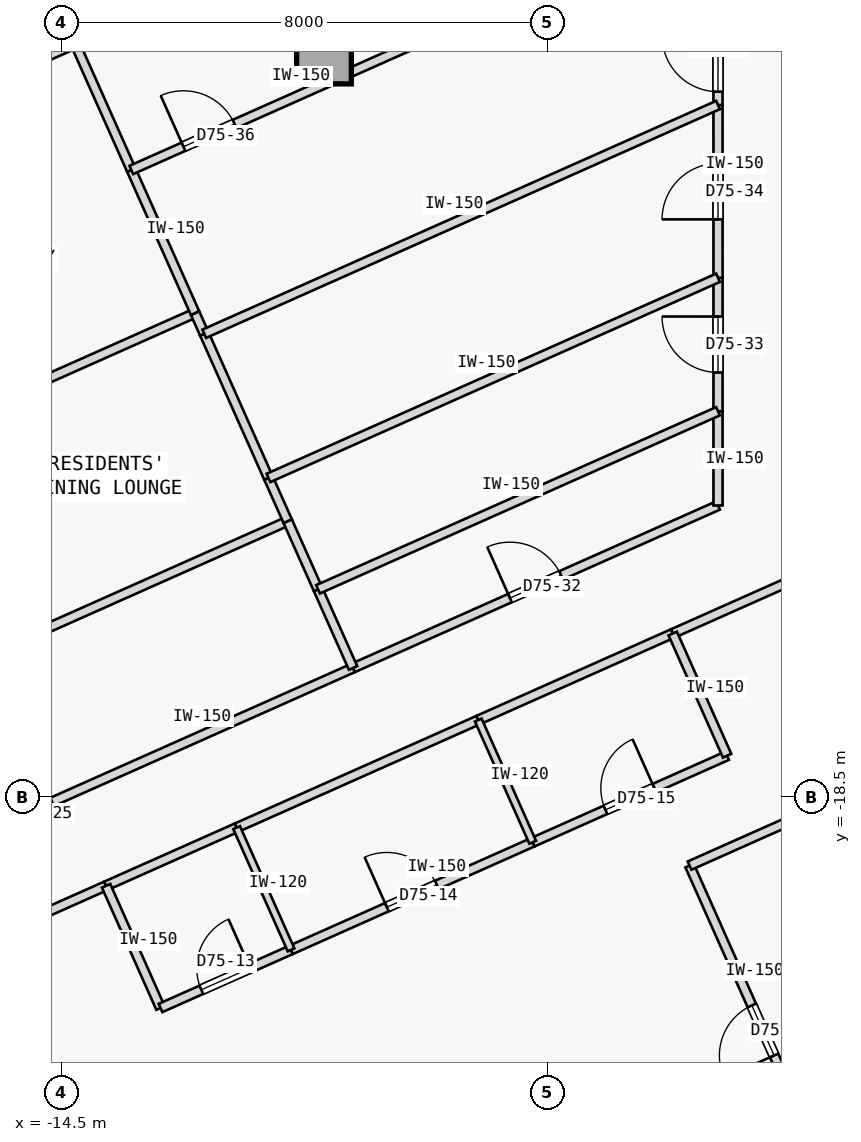
"""IFC4 building model, lengths in metres.
Left out: names, types, materials, properties, quantities, classifications, styles, units other than length and angle.
Written with IfcOpenShell. Run it as: python <this file> out.ifc"""

import sys

from ifc_helpers import new_model, si_unit, direction, frame, frame_2d, origin, origin_2d, place, context, subcontext, project, spatial, rectangle, extrude, element, fill, save


model = new_model("IFC4")
c1 = context("Model", 3, precision=1e-05, world=origin(), true_north=direction((0.0, 1.0)))
c2 = subcontext(c1, "Body", "Model", "MODEL_VIEW")
j1 = project(units=[si_unit("LENGTHUNIT", "METRE"), si_unit("PLANEANGLEUNIT", "RADIAN")], contexts=[c1])
p1 = place(None, origin())
s1 = spatial("IfcSite", under=j1, at=p1, CompositionType="ELEMENT")
p2 = place(p1, origin())
s2 = spatial("IfcBuilding", under=s1, at=p2, CompositionType="ELEMENT")
p3 = place(p2, frame((0.0, 0.0, 281.9)))
s3 = spatial("IfcBuildingStorey", under=s2, at=p3, CompositionType="ELEMENT", Elevation=281.9)
p4 = place(p3, frame((-10.18, -6.32, 0.0), z_axis=(0.0, 0.0, 1.0), x_axis=(1.0, 0.0, 0.0)))
e1 = element("IfcColumn", 1, at=p4, inside=s3, PredefinedType="COLUMN", context=c2, shape_type="SweptSolid", body=[
    extrude(rectangle(XDim=0.9, YDim=0.9, at=origin_2d()), origin(), (0.0, 0.0, 1.0), 3.35),
])
p5 = place(p3, frame((-19.786, -22.639, 0.0), z_axis=(0.0, 0.0, 1.0), x_axis=(0.913548717067, 0.406729322211, 0.0)))
e2 = element("IfcWall", 2, at=p5, inside=s3, PredefinedType="PARTITIONING", context=c2, shape_type="SweptSolid", body=[
    extrude(rectangle(XDim=6.593, YDim=0.15, at=frame_2d((3.297, 0.0))), origin(), (0.0, 0.0, 1.0), 3.125),
])
p6 = place(p3, frame((-4.445, -15.808, 0.0), z_axis=(0.0, 0.0, 1.0), x_axis=(0.913546853922, 0.406733506966, 0.0)))
e3 = element("IfcWall", 3, at=p6, inside=s3, PredefinedType="PARTITIONING", context=c2, shape_type="SweptSolid", body=[
    extrude(rectangle(XDim=12.751, YDim=0.15, at=frame_2d((6.375, 0.0))), origin(), (0.0, 0.0, 1.0), 3.125),
])
p7 = place(p6, frame((5.9, 0.0, 0.0)))
e4 = element("IfcOpeningElement", 4, at=p7, cuts=e3, PredefinedType="OPENING", context=c2, shape_type="SweptSolid", body=[
    extrude(rectangle(XDim=0.95, YDim=2.15, at=frame_2d((0.475, 1.075))), frame((0.0, 0.085, 0.0), z_axis=(0.0, -1.0, 0.0), x_axis=(1.0, 0.0, 0.0)), (0.0, 0.0, 1.0), 0.17),
])
p8 = place(p3, frame((-13.763, -19.957, 0.0), z_axis=(0.0, 0.0, 1.0), x_axis=(0.913541436194, 0.406745675276, 0.0)))
e5 = element("IfcWall", 5, at=p8, inside=s3, PredefinedType="PARTITIONING", context=c2, shape_type="SweptSolid", body=[
    extrude(rectangle(XDim=2.35, YDim=0.15, at=frame_2d((1.175, 0.0))), origin(), (0.0, 0.0, 1.0), 3.125),
])
p9 = place(p3, frame((-11.616, -19.001, 0.0), z_axis=(0.0, 0.0, 1.0), x_axis=(0.913545193015, 0.406737237438, 0.0)))
e6 = element("IfcWall", 6, at=p9, inside=s3, PredefinedType="PARTITIONING", context=c2, shape_type="SweptSolid", body=[
    extrude(rectangle(XDim=4.35, YDim=0.15, at=frame_2d((2.175, 0.0))), origin(), (0.0, 0.0, 1.0), 3.125),
])
p10 = place(p3, frame((-7.643, -17.232, 0.0), z_axis=(0.0, 0.0, 1.0), x_axis=(0.913549606868, 0.406727323635, 0.0)))
e7 = element("IfcWall", 7, at=p10, inside=s3, PredefinedType="PARTITIONING", context=c2, shape_type="SweptSolid", body=[
    extrude(rectangle(XDim=3.5, YDim=0.15, at=frame_2d((1.75, 0.0))), origin(), (0.0, 0.0, 1.0), 3.125),
])
p11 = place(p3, frame((-20.445, -21.159, 0.0), z_axis=(0.0, 0.0, 1.0), x_axis=(0.913547681516, 0.406731648137, 0.0)))
e8 = element("IfcWall", 8, at=p11, inside=s3, PredefinedType="PARTITIONING", context=c2, shape_type="SweptSolid", body=[
    extrude(rectangle(XDim=11.76, YDim=0.15, at=frame_2d((5.88, 0.0))), origin(), (0.0, 0.0, 1.0), 3.125),
])
p12 = place(p11, frame((5.42, 0.0, 0.0)))
e9 = element("IfcOpeningElement", 9, at=p12, cuts=e8, PredefinedType="OPENING", context=c2, shape_type="SweptSolid", body=[
    extrude(rectangle(XDim=0.92, YDim=2.15, at=frame_2d((0.46, 1.075))), frame((0.0, 0.085, 0.0), z_axis=(0.0, -1.0, 0.0), x_axis=(1.0, 0.0, 0.0)), (0.0, 0.0, 1.0), 0.17),
])
p13 = place(p3, frame((-9.702, -16.375, 0.0), z_axis=(0.0, 0.0, 1.0), x_axis=(0.913552389019, 0.406721074594, 0.0)))
e10 = element("IfcWall", 10, at=p13, inside=s3, PredefinedType="PARTITIONING", context=c2, shape_type="SweptSolid", body=[
    extrude(rectangle(XDim=6.57, YDim=0.15, at=frame_2d((3.285, 0.0))), origin(), (0.0, 0.0, 1.0), 3.125),
])
p14 = place(p13, frame((2.825, 0.0, 0.0)))
e11 = element("IfcOpeningElement", 11, at=p14, cuts=e10, PredefinedType="OPENING", context=c2, shape_type="SweptSolid", body=[
    extrude(rectangle(XDim=0.92, YDim=2.15, at=frame_2d((0.46, 1.075))), frame((0.0, 0.085, 0.0), z_axis=(0.0, -1.0, 0.0), x_axis=(1.0, 0.0, 0.0)), (0.0, 0.0, 1.0), 0.17),
])
p15 = place(p3, frame((-3.7, -13.703, 0.0), z_axis=(0.0, 0.0, 1.0), x_axis=(-0.000157529929, 0.999999987592, 0.0)))
e12 = element("IfcWall", 12, at=p15, inside=s3, PredefinedType="PARTITIONING", context=c2, shape_type="SweptSolid", body=[
    extrude(rectangle(XDim=1.55, YDim=0.15, at=frame_2d((0.775, 0.0))), origin(), (0.0, 0.0, 1.0), 3.125),
])
p16 = place(p3, frame((-3.7, -12.154, 0.0), z_axis=(0.0, 0.0, 1.0), x_axis=(0.000111222333, 0.999999993815, 0.0)))
e13 = element("IfcWall", 13, at=p16, inside=s3, PredefinedType="PARTITIONING", context=c2, shape_type="SweptSolid", body=[
    extrude(rectangle(XDim=2.195, YDim=0.15, at=frame_2d((1.098, 0.0))), origin(), (0.0, 0.0, 1.0), 3.125),
])
p17 = place(p16, frame((0.637, 0.0, 0.0)))
e14 = element("IfcOpeningElement", 14, at=p17, cuts=e13, PredefinedType="OPENING", context=c2, shape_type="SweptSolid", body=[
    extrude(rectangle(XDim=0.92, YDim=2.15, at=frame_2d((0.46, 1.075))), frame((0.0, 0.085, 0.0), z_axis=(0.0, -1.0, 0.0), x_axis=(1.0, 0.0, 0.0)), (0.0, 0.0, 1.0), 0.17),
])
p18 = place(p3, frame((-3.7, -9.958, 0.0), z_axis=(0.0, 0.0, 1.0), x_axis=(-0.000171909917, 0.999999985223, 0.0)))
e15 = element("IfcWall", 15, at=p18, inside=s3, PredefinedType="PARTITIONING", context=c2, shape_type="SweptSolid", body=[
    extrude(rectangle(XDim=2.84, YDim=0.15, at=frame_2d((1.42, 0.0))), origin(), (0.0, 0.0, 1.0), 3.125),
])
p19 = place(p18, frame((0.96, 0.0, 0.0)))
e16 = element("IfcOpeningElement", 16, at=p19, cuts=e15, PredefinedType="OPENING", context=c2, shape_type="SweptSolid", body=[
    extrude(rectangle(XDim=0.92, YDim=2.15, at=frame_2d((0.46, 1.075))), frame((0.0, 0.085, 0.0), z_axis=(0.0, -1.0, 0.0), x_axis=(1.0, 0.0, 0.0)), (0.0, 0.0, 1.0), 0.17),
])
p20 = place(p3, frame((-3.7, -7.118, 0.0), z_axis=(0.0, 0.0, 1.0), x_axis=(0.000321543392, 0.999999948305, 0.0)))
e17 = element("IfcWall", 17, at=p20, inside=s3, PredefinedType="PARTITIONING", context=c2, shape_type="SweptSolid", body=[
    extrude(rectangle(XDim=1.519, YDim=0.15, at=frame_2d((0.759, 0.0))), origin(), (0.0, 0.0, 1.0), 3.125),
])
p21 = place(p20, frame((0.22, 0.0, 0.0)))
e18 = element("IfcOpeningElement", 18, at=p21, cuts=e17, PredefinedType="OPENING", context=c2, shape_type="SweptSolid", body=[
    extrude(rectangle(XDim=0.92, YDim=2.15, at=frame_2d((0.46, 1.075))), frame((0.0, 0.085, 0.0), z_axis=(0.0, -1.0, 0.0), x_axis=(1.0, 0.0, 0.0)), (0.0, 0.0, 1.0), 0.17),
])
p22 = place(p3, frame((-12.868, -21.967, 0.0), z_axis=(0.0, 0.0, 1.0), x_axis=(-0.406725294076, 0.913550510459, 0.0)))
e19 = element("IfcWall", 19, at=p22, inside=s3, PredefinedType="PARTITIONING", context=c2, shape_type="SweptSolid", body=[
    extrude(rectangle(XDim=2.2, YDim=0.15, at=frame_2d((1.1, 0.0))), origin(), (0.0, 0.0, 1.0), 3.125),
])
p23 = place(p3, frame((-12.868, -21.967, 0.0), z_axis=(0.0, 0.0, 1.0), x_axis=(0.913541436194, 0.406745675276, 0.0)))
e20 = element("IfcWall", 20, at=p23, inside=s3, PredefinedType="PARTITIONING", context=c2, shape_type="SweptSolid", body=[
    extrude(rectangle(XDim=2.35, YDim=0.15, at=frame_2d((1.175, 0.0))), origin(), (0.0, 0.0, 1.0), 3.125),
])
p24 = place(p23, frame((0.735, 0.0, 0.0)))
e21 = element("IfcOpeningElement", 21, at=p24, cuts=e20, PredefinedType="OPENING", context=c2, shape_type="SweptSolid", body=[
    extrude(rectangle(XDim=0.88, YDim=2.15, at=frame_2d((0.44, 1.075))), frame((0.0, 0.085, 0.0), z_axis=(0.0, -1.0, 0.0), x_axis=(1.0, 0.0, 0.0)), (0.0, 0.0, 1.0), 0.17),
])
p25 = place(p3, frame((-10.722, -21.011, 0.0), z_axis=(0.0, 0.0, 1.0), x_axis=(0.913545193015, 0.406737237438, 0.0)))
e22 = element("IfcWall", 22, at=p25, inside=s3, PredefinedType="PARTITIONING", context=c2, shape_type="SweptSolid", body=[
    extrude(rectangle(XDim=4.35, YDim=0.15, at=frame_2d((2.175, 0.0))), origin(), (0.0, 0.0, 1.0), 3.125),
])
p26 = place(p25, frame((1.725, 0.0, 0.0)))
e23 = element("IfcOpeningElement", 23, at=p26, cuts=e22, PredefinedType="OPENING", context=c2, shape_type="SweptSolid", body=[
    extrude(rectangle(XDim=0.9, YDim=2.15, at=frame_2d((0.45, 1.075))), frame((0.0, 0.085, 0.0), z_axis=(0.0, -1.0, 0.0), x_axis=(1.0, 0.0, 0.0)), (0.0, 0.0, 1.0), 0.17),
])
p27 = place(p3, frame((-6.748, -19.242, 0.0), z_axis=(0.0, 0.0, 1.0), x_axis=(0.913549606868, 0.406727323635, 0.0)))
e24 = element("IfcWall", 24, at=p27, inside=s3, PredefinedType="PARTITIONING", context=c2, shape_type="SweptSolid", body=[
    extrude(rectangle(XDim=3.5, YDim=0.15, at=frame_2d((1.75, 0.0))), origin(), (0.0, 0.0, 1.0), 3.125),
])
p28 = place(p27, frame((1.31, 0.0, 0.0)))
e25 = element("IfcOpeningElement", 25, at=p28, cuts=e24, PredefinedType="OPENING", context=c2, shape_type="SweptSolid", body=[
    extrude(rectangle(XDim=0.88, YDim=2.15, at=frame_2d((0.44, 1.075))), frame((0.0, 0.085, 0.0), z_axis=(0.0, -1.0, 0.0), x_axis=(1.0, 0.0, 0.0)), (0.0, 0.0, 1.0), 0.17),
])
p29 = place(p3, frame((-3.55, -17.818, 0.0), z_axis=(0.0, 0.0, 1.0), x_axis=(-0.406725294076, 0.913550510459, 0.0)))
e26 = element("IfcWall", 26, at=p29, inside=s3, PredefinedType="PARTITIONING", context=c2, shape_type="SweptSolid", body=[
    extrude(rectangle(XDim=2.2, YDim=0.15, at=frame_2d((1.1, 0.0))), origin(), (0.0, 0.0, 1.0), 3.125),
])
p30 = place(p3, frame((-1.754, -25.047, 0.0), z_axis=(0.0, 0.0, 1.0), x_axis=(-0.406714717734, 0.913555219119, 0.0)))
e27 = element("IfcWall", 27, at=p30, inside=s3, PredefinedType="PARTITIONING", context=c2, shape_type="SweptSolid", body=[
    extrude(rectangle(XDim=5.935, YDim=0.15, at=frame_2d((2.967, 0.0))), origin(), (0.0, 0.0, 1.0), 3.125),
])
p31 = place(p30, frame((2.518, 0.0, 0.0)))
e28 = element("IfcOpeningElement", 28, at=p31, cuts=e27, PredefinedType="OPENING", context=c2, shape_type="SweptSolid", body=[
    extrude(rectangle(XDim=0.9, YDim=2.15, at=frame_2d((0.45, 1.075))), frame((0.0, 0.085, 0.0), z_axis=(0.0, -1.0, 0.0), x_axis=(1.0, 0.0, 0.0)), (0.0, 0.0, 1.0), 0.17),
])
p32 = place(p3, frame((-4.167, -19.625, 0.0), z_axis=(0.0, 0.0, 1.0), x_axis=(0.913536363976, 0.406757067172, 0.0)))
e29 = element("IfcWall", 29, at=p32, inside=s3, PredefinedType="PARTITIONING", context=c2, shape_type="SweptSolid", body=[
    extrude(rectangle(XDim=4.65, YDim=0.15, at=frame_2d((2.325, 0.0))), origin(), (0.0, 0.0, 1.0), 3.125),
])
for number, where, z_axis, x_axis in (
    (30, (-10.722, -21.011, 0.0), (0.0, 0.0, 1.0), (-0.407, 0.914, 0.0)),
    (31, (-6.748, -19.242, 0.0), (0.0, 0.0, 1.0), (-0.407, 0.914, 0.0)),
):
    element("IfcWall", number, at=place(p3, frame(where, z_axis=z_axis, x_axis=x_axis)), inside=s3, PredefinedType="PARTITIONING", context=c2, shape_type="SweptSolid", body=[
        extrude(rectangle(XDim=2.2, YDim=0.12, at=frame_2d((1.1, 0.0))), origin(), (0.0, 0.0, 1.0), 3.125),
    ])
p33 = place(p3, frame((-21.52, -18.744, 0.0), z_axis=(0.0, 0.0, 1.0), x_axis=(0.913539967617, 0.406748973651, 0.0)))
e32 = element("IfcWall", 32, at=p33, inside=s3, PredefinedType="PARTITIONING", context=c2, shape_type="SweptSolid", body=[
    extrude(rectangle(XDim=11.76, YDim=0.15, at=frame_2d((5.88, 0.0))), origin(), (0.0, 0.0, 1.0), 3.125),
])
p34 = place(p33, frame((5.42, 0.0, 0.0)))
e33 = element("IfcOpeningElement", 33, at=p34, cuts=e32, PredefinedType="OPENING", context=c2, shape_type="SweptSolid", body=[
    extrude(rectangle(XDim=0.92, YDim=2.15, at=frame_2d((0.46, 1.075))), frame((0.0, 0.085, 0.0), z_axis=(0.0, -1.0, 0.0), x_axis=(1.0, 0.0, 0.0)), (0.0, 0.0, 1.0), 0.17),
])
p35 = place(p3, frame((-9.702, -16.375, 0.0), z_axis=(0.0, 0.0, 1.0), x_axis=(-0.406762319034, 0.913534025537, 0.0)))
e34 = element("IfcWall", 34, at=p35, inside=s3, PredefinedType="PARTITIONING", context=c2, shape_type="SweptSolid", body=[
    extrude(rectangle(XDim=1.416, YDim=0.15, at=frame_2d((0.708, 0.0))), origin(), (0.0, 0.0, 1.0), 3.125),
])
p36 = place(p3, frame((-10.278, -15.082, 0.0), z_axis=(0.0, 0.0, 1.0), x_axis=(-0.406655262741, 0.913581686159, 0.0)))
e35 = element("IfcWall", 35, at=p36, inside=s3, PredefinedType="PARTITIONING", context=c2, shape_type="SweptSolid", body=[
    extrude(rectangle(XDim=1.227, YDim=0.15, at=frame_2d((0.614, 0.0))), origin(), (0.0, 0.0, 1.0), 3.125),
])
p37 = place(p3, frame((-23.043, -15.323, 0.0), z_axis=(0.0, 0.0, 1.0), x_axis=(0.913547681516, 0.406731648137, 0.0)))
e36 = element("IfcWall", 36, at=p37, inside=s3, PredefinedType="PARTITIONING", context=c2, shape_type="SweptSolid", body=[
    extrude(rectangle(XDim=11.76, YDim=0.15, at=frame_2d((5.88, 0.0))), origin(), (0.0, 0.0, 1.0), 3.125),
])
p38 = place(p37, frame((5.42, 0.0, 0.0)))
e37 = element("IfcOpeningElement", 37, at=p38, cuts=e36, PredefinedType="OPENING", context=c2, shape_type="SweptSolid", body=[
    extrude(rectangle(XDim=0.92, YDim=2.15, at=frame_2d((0.46, 1.075))), frame((0.0, 0.085, 0.0), z_axis=(0.0, -1.0, 0.0), x_axis=(1.0, 0.0, 0.0)), (0.0, 0.0, 1.0), 0.17),
])
p39 = place(p3, frame((-10.777, -13.961, 0.0), z_axis=(0.0, 0.0, 1.0), x_axis=(-0.406720744325, 0.913552536057, 0.0)))
e38 = element("IfcWall", 38, at=p39, inside=s3, PredefinedType="PARTITIONING", context=c2, shape_type="SweptSolid", body=[
    extrude(rectangle(XDim=0.778, YDim=0.15, at=frame_2d((0.389, 0.0))), origin(), (0.0, 0.0, 1.0), 3.125),
])
p40 = place(p3, frame((-11.093, -13.25, 0.0), z_axis=(0.0, 0.0, 1.0), x_axis=(-0.406723252866, 0.91355141923, 0.0)))
e39 = element("IfcWall", 39, at=p40, inside=s3, PredefinedType="PARTITIONING", context=c2, shape_type="SweptSolid", body=[
    extrude(rectangle(XDim=2.595, YDim=0.15, at=frame_2d((1.297, 0.0))), origin(), (0.0, 0.0, 1.0), 3.125),
])
p41 = place(p3, frame((-12.149, -10.88, 0.0), z_axis=(0.0, 0.0, 1.0), x_axis=(-0.406868995548, 0.913486519037, 0.0)))
e40 = element("IfcWall", 40, at=p41, inside=s3, PredefinedType="PARTITIONING", context=c2, shape_type="SweptSolid", body=[
    extrude(rectangle(XDim=0.372, YDim=0.15, at=frame_2d((0.186, 0.0))), origin(), (0.0, 0.0, 1.0), 3.125),
])
p42 = place(p3, frame((-25.014, -10.896, 0.0), z_axis=(0.0, 0.0, 1.0), x_axis=(0.913544247064, 0.406739362069, 0.0)))
e41 = element("IfcWall", 41, at=p42, inside=s3, PredefinedType="PARTITIONING", context=c2, shape_type="SweptSolid", body=[
    extrude(rectangle(XDim=11.76, YDim=0.15, at=frame_2d((5.88, 0.0))), origin(), (0.0, 0.0, 1.0), 3.125),
])
p43 = place(p42, frame((5.42, 0.0, 0.0)))
e42 = element("IfcOpeningElement", 42, at=p43, cuts=e41, PredefinedType="OPENING", context=c2, shape_type="SweptSolid", body=[
    extrude(rectangle(XDim=0.92, YDim=2.15, at=frame_2d((0.46, 1.075))), frame((0.0, 0.085, 0.0), z_axis=(0.0, -1.0, 0.0), x_axis=(1.0, 0.0, 0.0)), (0.0, 0.0, 1.0), 0.17),
])
p44 = place(p3, frame((-12.3, -10.54, 0.0), z_axis=(0.0, 0.0, 1.0), x_axis=(-0.406788806475, 0.913522231216, 0.0)))
e43 = element("IfcWall", 43, at=p44, inside=s3, PredefinedType="PARTITIONING", context=c2, shape_type="SweptSolid", body=[
    extrude(rectangle(XDim=2.577, YDim=0.15, at=frame_2d((1.289, 0.0))), origin(), (0.0, 0.0, 1.0), 3.125),
])
p45 = place(p3, frame((-13.348, -8.186, 0.0), z_axis=(0.0, 0.0, 1.0), x_axis=(-0.40673740295, 0.913545119324, 0.0)))
e44 = element("IfcWall", 44, at=p45, inside=s3, PredefinedType="PARTITIONING", context=c2, shape_type="SweptSolid", body=[
    extrude(rectangle(XDim=2.269, YDim=0.15, at=frame_2d((1.134, 0.0))), origin(), (0.0, 0.0, 1.0), 3.125),
])
p46 = place(p3, frame((-10.278, -15.082, 0.0), z_axis=(0.0, 0.0, 1.0), x_axis=(0.913549882956, 0.406726703513, 0.0)))
e45 = element("IfcWall", 45, at=p46, inside=s3, PredefinedType="PARTITIONING", context=c2, shape_type="SweptSolid", body=[
    extrude(rectangle(XDim=7.2, YDim=0.15, at=frame_2d((3.6, 0.0))), origin(), (0.0, 0.0, 1.0), 3.125),
])
p47 = place(p3, frame((-11.093, -13.25, 0.0), z_axis=(0.0, 0.0, 1.0), x_axis=(0.913543891457, 0.406740160767, 0.0)))
e46 = element("IfcWall", 46, at=p47, inside=s3, PredefinedType="PARTITIONING", context=c2, shape_type="SweptSolid", body=[
    extrude(rectangle(XDim=8.093, YDim=0.15, at=frame_2d((4.046, 0.0))), origin(), (0.0, 0.0, 1.0), 3.125),
])
p48 = place(p3, frame((-12.149, -10.88, 0.0), z_axis=(0.0, 0.0, 1.0), x_axis=(0.913542450291, 0.406743397631, 0.0)))
e47 = element("IfcWall", 47, at=p48, inside=s3, PredefinedType="PARTITIONING", context=c2, shape_type="SweptSolid", body=[
    extrude(rectangle(XDim=9.248, YDim=0.15, at=frame_2d((4.624, 0.0))), origin(), (0.0, 0.0, 1.0), 3.125),
])
p49 = place(p3, frame((-13.348, -8.186, 0.0), z_axis=(0.0, 0.0, 1.0), x_axis=(0.913551673432, 0.406722681896, 0.0)))
e48 = element("IfcWall", 48, at=p49, inside=s3, PredefinedType="PARTITIONING", context=c2, shape_type="SweptSolid", body=[
    extrude(rectangle(XDim=6.358, YDim=0.15, at=frame_2d((3.179, 0.0))), origin(), (0.0, 0.0, 1.0), 3.125),
])
p50 = place(p49, frame((0.939, 0.0, 0.0)))
e49 = element("IfcOpeningElement", 49, at=p50, cuts=e48, PredefinedType="OPENING", context=c2, shape_type="SweptSolid", body=[
    extrude(rectangle(XDim=0.92, YDim=2.15, at=frame_2d((0.46, 1.075))), frame((0.0, 0.085, 0.0), z_axis=(0.0, -1.0, 0.0), x_axis=(1.0, 0.0, 0.0)), (0.0, 0.0, 1.0), 0.17),
])
p51 = place(p24, origin())
e50 = element("IfcDoor", 50, at=p51, inside=s3, OperationType="SINGLE_SWING_RIGHT", PredefinedType="DOOR", context=c2, shape_type="SweptSolid", body=[
    extrude(rectangle(XDim=0.88, YDim=2.15, at=frame_2d((0.44, 1.075))), frame((0.0, 0.025, 0.0), z_axis=(0.0, -1.0, 0.0), x_axis=(1.0, 0.0, 0.0)), (0.0, 0.0, 1.0), 0.05),
])
fill(e21, e50)
p52 = place(p26, origin())
e51 = element("IfcDoor", 51, at=p52, inside=s3, OperationType="SINGLE_SWING_LEFT", PredefinedType="DOOR", context=c2, shape_type="SweptSolid", body=[
    extrude(rectangle(XDim=0.9, YDim=2.15, at=frame_2d((0.45, 1.075))), frame((0.0, 0.025, 0.0), z_axis=(0.0, -1.0, 0.0), x_axis=(1.0, 0.0, 0.0)), (0.0, 0.0, 1.0), 0.05),
])
fill(e23, e51)
p53 = place(p28, origin())
e52 = element("IfcDoor", 52, at=p53, inside=s3, OperationType="SINGLE_SWING_RIGHT", PredefinedType="DOOR", context=c2, shape_type="SweptSolid", body=[
    extrude(rectangle(XDim=0.88, YDim=2.15, at=frame_2d((0.44, 1.075))), frame((0.0, 0.025, 0.0), z_axis=(0.0, -1.0, 0.0), x_axis=(1.0, 0.0, 0.0)), (0.0, 0.0, 1.0), 0.05),
])
fill(e25, e52)
p54 = place(p31, origin())
e53 = element("IfcDoor", 53, at=p54, inside=s3, OperationType="SINGLE_SWING_LEFT", PredefinedType="DOOR", context=c2, shape_type="SweptSolid", body=[
    extrude(rectangle(XDim=0.9, YDim=2.15, at=frame_2d((0.45, 1.075))), frame((0.0, 0.025, 0.0), z_axis=(0.0, -1.0, 0.0), x_axis=(1.0, 0.0, 0.0)), (0.0, 0.0, 1.0), 0.05),
])
fill(e28, e53)
p55 = place(p12, origin())
e54 = element("IfcDoor", 54, at=p55, inside=s3, OperationType="SINGLE_SWING_RIGHT", PredefinedType="DOOR", context=c2, shape_type="SweptSolid", body=[
    extrude(rectangle(XDim=0.92, YDim=2.15, at=frame_2d((0.46, 1.075))), frame((0.0, 0.025, 0.0), z_axis=(0.0, -1.0, 0.0), x_axis=(1.0, 0.0, 0.0)), (0.0, 0.0, 1.0), 0.05),
])
fill(e9, e54)
p56 = place(p14, origin())
e55 = element("IfcDoor", 55, at=p56, inside=s3, OperationType="SINGLE_SWING_LEFT", PredefinedType="DOOR", context=c2, shape_type="SweptSolid", body=[
    extrude(rectangle(XDim=0.92, YDim=2.15, at=frame_2d((0.46, 1.075))), frame((0.0, 0.025, 0.0), z_axis=(0.0, -1.0, 0.0), x_axis=(1.0, 0.0, 0.0)), (0.0, 0.0, 1.0), 0.05),
])
fill(e11, e55)
p57 = place(p17, origin())
e56 = element("IfcDoor", 56, at=p57, inside=s3, OperationType="SINGLE_SWING_RIGHT", PredefinedType="DOOR", context=c2, shape_type="SweptSolid", body=[
    extrude(rectangle(XDim=0.92, YDim=2.15, at=frame_2d((0.46, 1.075))), frame((0.0, 0.025, 0.0), z_axis=(0.0, -1.0, 0.0), x_axis=(1.0, 0.0, 0.0)), (0.0, 0.0, 1.0), 0.05),
])
fill(e14, e56)
p58 = place(p19, origin())
e57 = element("IfcDoor", 57, at=p58, inside=s3, OperationType="SINGLE_SWING_LEFT", PredefinedType="DOOR", context=c2, shape_type="SweptSolid", body=[
    extrude(rectangle(XDim=0.92, YDim=2.15, at=frame_2d((0.46, 1.075))), frame((0.0, 0.025, 0.0), z_axis=(0.0, -1.0, 0.0), x_axis=(1.0, 0.0, 0.0)), (0.0, 0.0, 1.0), 0.05),
])
fill(e16, e57)
p59 = place(p21, origin())
e58 = element("IfcDoor", 58, at=p59, inside=s3, OperationType="SINGLE_SWING_RIGHT", PredefinedType="DOOR", context=c2, shape_type="SweptSolid", body=[
    extrude(rectangle(XDim=0.92, YDim=2.15, at=frame_2d((0.46, 1.075))), frame((0.0, 0.025, 0.0), z_axis=(0.0, -1.0, 0.0), x_axis=(1.0, 0.0, 0.0)), (0.0, 0.0, 1.0), 0.05),
])
fill(e18, e58)
p60 = place(p50, origin())
e59 = element("IfcDoor", 59, at=p60, inside=s3, OperationType="SINGLE_SWING_LEFT", PredefinedType="DOOR", context=c2, shape_type="SweptSolid", body=[
    extrude(rectangle(XDim=0.92, YDim=2.15, at=frame_2d((0.46, 1.075))), frame((0.0, 0.025, 0.0), z_axis=(0.0, -1.0, 0.0), x_axis=(1.0, 0.0, 0.0)), (0.0, 0.0, 1.0), 0.05),
])
fill(e49, e59)
save(model, sys.argv[1])
